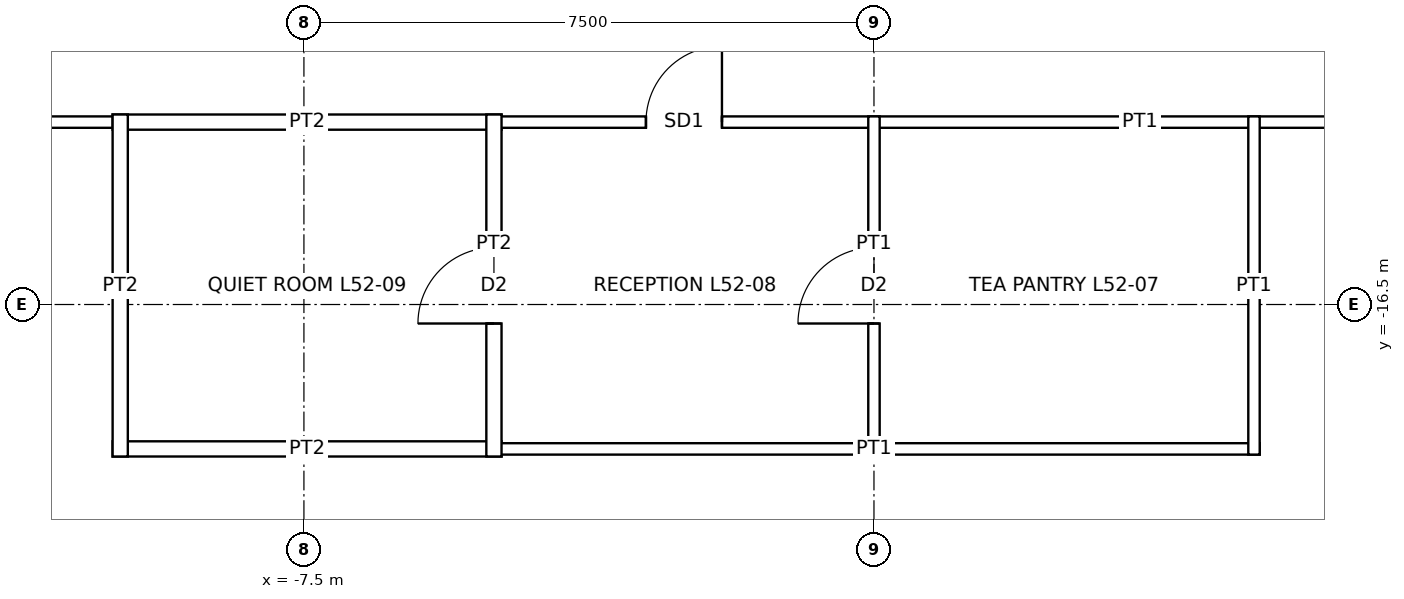
"""IFC4 building model, lengths in metres.
Left out: names, types, materials, properties, quantities, classifications, styles, units other than length and angle.
Written with IfcOpenShell. Run it as: python <this file> out.ifc"""

import sys

from ifc_helpers import new_model, si_unit, direction, frame, frame_2d, origin, place, context, subcontext, project, spatial, rectangle, extrude, element, fill, save


model = new_model("IFC4")
c1 = context("Model", 3, precision=1e-05, world=origin(), true_north=direction((0.0, 1.0)))
c2 = subcontext(c1, "Body", "Model", "MODEL_VIEW")
j1 = project(units=[si_unit("LENGTHUNIT", "METRE"), si_unit("PLANEANGLEUNIT", "RADIAN")], contexts=[c1])
p1 = place(None, origin())
s1 = spatial("IfcSite", under=j1, at=p1, CompositionType="ELEMENT")
p2 = place(p1, origin())
s2 = spatial("IfcBuilding", under=s1, at=p2, CompositionType="ELEMENT")
p3 = place(p2, frame((0.0, 0.0, 241.9)))
s3 = spatial("IfcBuildingStorey", under=s2, at=p3, CompositionType="ELEMENT", Elevation=241.9)
p4 = place(p3, frame((-10.017, -18.4, 0.0), z_axis=(0.0, 0.0, 1.0), x_axis=(1.0, 0.0, 0.0)))
e1 = element("IfcWall", 1, at=p4, inside=s3, PredefinedType="PARTITIONING", context=c2, shape_type="SweptSolid", body=[
    extrude(rectangle(XDim=5.117, YDim=0.2, at=frame_2d((2.559, 0.0))), origin(), (0.0, 0.0, 1.0), 3.85),
])
p5 = place(p3, frame((-5.075, -18.4, 0.0), z_axis=(0.0, 0.0, 1.0), x_axis=(1.0, 0.0, 0.0)))
e2 = element("IfcWall", 2, at=p5, inside=s3, PredefinedType="PARTITIONING", context=c2, shape_type="SweptSolid", body=[
    extrude(rectangle(XDim=10.15, YDim=0.15, at=frame_2d((5.075, 0.0))), origin(), (0.0, 0.0, 1.0), 3.85),
])
p6 = place(p3, frame((-14.175, -14.1, 0.0), z_axis=(0.0, 0.0, 1.0), x_axis=(1.0, 0.0, 0.0)))
e3 = element("IfcWall", 3, at=p6, inside=s3, PredefinedType="PARTITIONING", context=c2, shape_type="SweptSolid", body=[
    extrude(rectangle(XDim=4.333, YDim=0.15, at=frame_2d((2.167, 0.0))), origin(), (0.0, 0.0, 1.0), 3.85),
])
p7 = place(p3, frame((-10.017, -14.1, 0.0), z_axis=(0.0, 0.0, 1.0), x_axis=(1.0, 0.0, 0.0)))
e4 = element("IfcWall", 4, at=p7, inside=s3, PredefinedType="PARTITIONING", context=c2, shape_type="SweptSolid", body=[
    extrude(rectangle(XDim=5.117, YDim=0.2, at=frame_2d((2.559, 0.0))), origin(), (0.0, 0.0, 1.0), 3.85),
])
p8 = place(p3, frame((-5.075, -14.1, 0.0), z_axis=(0.0, 0.0, 1.0), x_axis=(1.0, 0.0, 0.0)))
e5 = element("IfcWall", 5, at=p8, inside=s3, PredefinedType="PARTITIONING", context=c2, shape_type="SweptSolid", body=[
    extrude(rectangle(XDim=17.15, YDim=0.15, at=frame_2d((8.575, 0.0))), origin(), (0.0, 0.0, 1.0), 3.85),
])
p9 = place(p8, frame((2.075, 0.0, 0.0)))
e6 = element("IfcOpeningElement", 6, at=p9, cuts=e5, PredefinedType="OPENING", context=c2, shape_type="SweptSolid", body=[
    extrude(rectangle(XDim=1.0, YDim=2.4, at=frame_2d((0.5, 1.2))), frame((0.0, 0.085, 0.0), z_axis=(0.0, -1.0, 0.0), x_axis=(1.0, 0.0, 0.0)), (0.0, 0.0, 1.0), 0.17),
])
p10 = place(p3, frame((-9.917, -18.5, 0.0), z_axis=(0.0, 0.0, 1.0), x_axis=(0.0, 1.0, 0.0)))
e7 = element("IfcWall", 7, at=p10, inside=s3, PredefinedType="PARTITIONING", context=c2, shape_type="SweptSolid", body=[
    extrude(rectangle(XDim=4.5, YDim=0.2, at=frame_2d((2.25, 0.0))), origin(), (0.0, 0.0, 1.0), 3.85),
])
p11 = place(p3, frame((-5.0, -18.5, 0.0), z_axis=(0.0, 0.0, 1.0), x_axis=(0.0, 1.0, 0.0)))
e8 = element("IfcWall", 8, at=p11, inside=s3, PredefinedType="PARTITIONING", context=c2, shape_type="SweptSolid", body=[
    extrude(rectangle(XDim=4.5, YDim=0.2, at=frame_2d((2.25, 0.0))), origin(), (0.0, 0.0, 1.0), 3.85),
])
p12 = place(p11, frame((1.75, 0.0, 0.0)))
e9 = element("IfcOpeningElement", 9, at=p12, cuts=e8, PredefinedType="OPENING", context=c2, shape_type="SweptSolid", body=[
    extrude(rectangle(XDim=1.0, YDim=2.1, at=frame_2d((0.5, 1.05))), frame((0.0, 0.11, 0.0), z_axis=(0.0, -1.0, 0.0), x_axis=(1.0, 0.0, 0.0)), (0.0, 0.0, 1.0), 0.22),
])
p13 = place(p3, frame((0.0, -18.475, 0.0), z_axis=(0.0, 0.0, 1.0), x_axis=(0.0, 1.0, 0.0)))
e10 = element("IfcWall", 10, at=p13, inside=s3, PredefinedType="PARTITIONING", context=c2, shape_type="SweptSolid", body=[
    extrude(rectangle(XDim=4.45, YDim=0.15, at=frame_2d((2.225, 0.0))), origin(), (0.0, 0.0, 1.0), 3.238),
])
p14 = place(p13, frame((1.725, 0.0, 0.0)))
e11 = element("IfcOpeningElement", 11, at=p14, cuts=e10, PredefinedType="OPENING", context=c2, shape_type="SweptSolid", body=[
    extrude(rectangle(XDim=1.0, YDim=2.1, at=frame_2d((0.5, 1.05))), frame((0.0, 0.085, 0.0), z_axis=(0.0, -1.0, 0.0), x_axis=(1.0, 0.0, 0.0)), (0.0, 0.0, 1.0), 0.17),
])
p15 = place(p3, frame((5.0, -18.475, 0.0), z_axis=(0.0, 0.0, 1.0), x_axis=(0.0, 1.0, 0.0)))
e12 = element("IfcWall", 12, at=p15, inside=s3, PredefinedType="PARTITIONING", context=c2, shape_type="SweptSolid", body=[
    extrude(rectangle(XDim=4.45, YDim=0.15, at=frame_2d((2.225, 0.0))), origin(), (0.0, 0.0, 1.0), 3.85),
])
p16 = place(p14, origin())
e13 = element("IfcDoor", 13, at=p16, inside=s3, OperationType="SINGLE_SWING_LEFT", PredefinedType="DOOR", context=c2, shape_type="SweptSolid", body=[
    extrude(rectangle(XDim=1.0, YDim=2.1, at=frame_2d((0.5, 1.05))), frame((0.0, 0.025, 0.0), z_axis=(0.0, -1.0, 0.0), x_axis=(1.0, 0.0, 0.0)), (0.0, 0.0, 1.0), 0.05),
])
fill(e11, e13)
p17 = place(p9, origin())
e14 = element("IfcDoor", 14, at=p17, inside=s3, OperationType="SINGLE_SWING_RIGHT", PredefinedType="DOOR", context=c2, shape_type="SweptSolid", body=[
    extrude(rectangle(XDim=1.0, YDim=2.4, at=frame_2d((0.5, 1.2))), frame((0.0, 0.025, 0.0), z_axis=(0.0, -1.0, 0.0), x_axis=(1.0, 0.0, 0.0)), (0.0, 0.0, 1.0), 0.05),
])
fill(e6, e14)
p18 = place(p12, origin())
e15 = element("IfcDoor", 15, at=p18, inside=s3, OperationType="SINGLE_SWING_LEFT", PredefinedType="DOOR", context=c2, shape_type="SweptSolid", body=[
    extrude(rectangle(XDim=1.0, YDim=2.1, at=frame_2d((0.5, 1.05))), frame((0.0, 0.025, 0.0), z_axis=(0.0, -1.0, 0.0), x_axis=(1.0, 0.0, 0.0)), (0.0, 0.0, 1.0), 0.05),
])
fill(e9, e15)
save(model, sys.argv[1])
